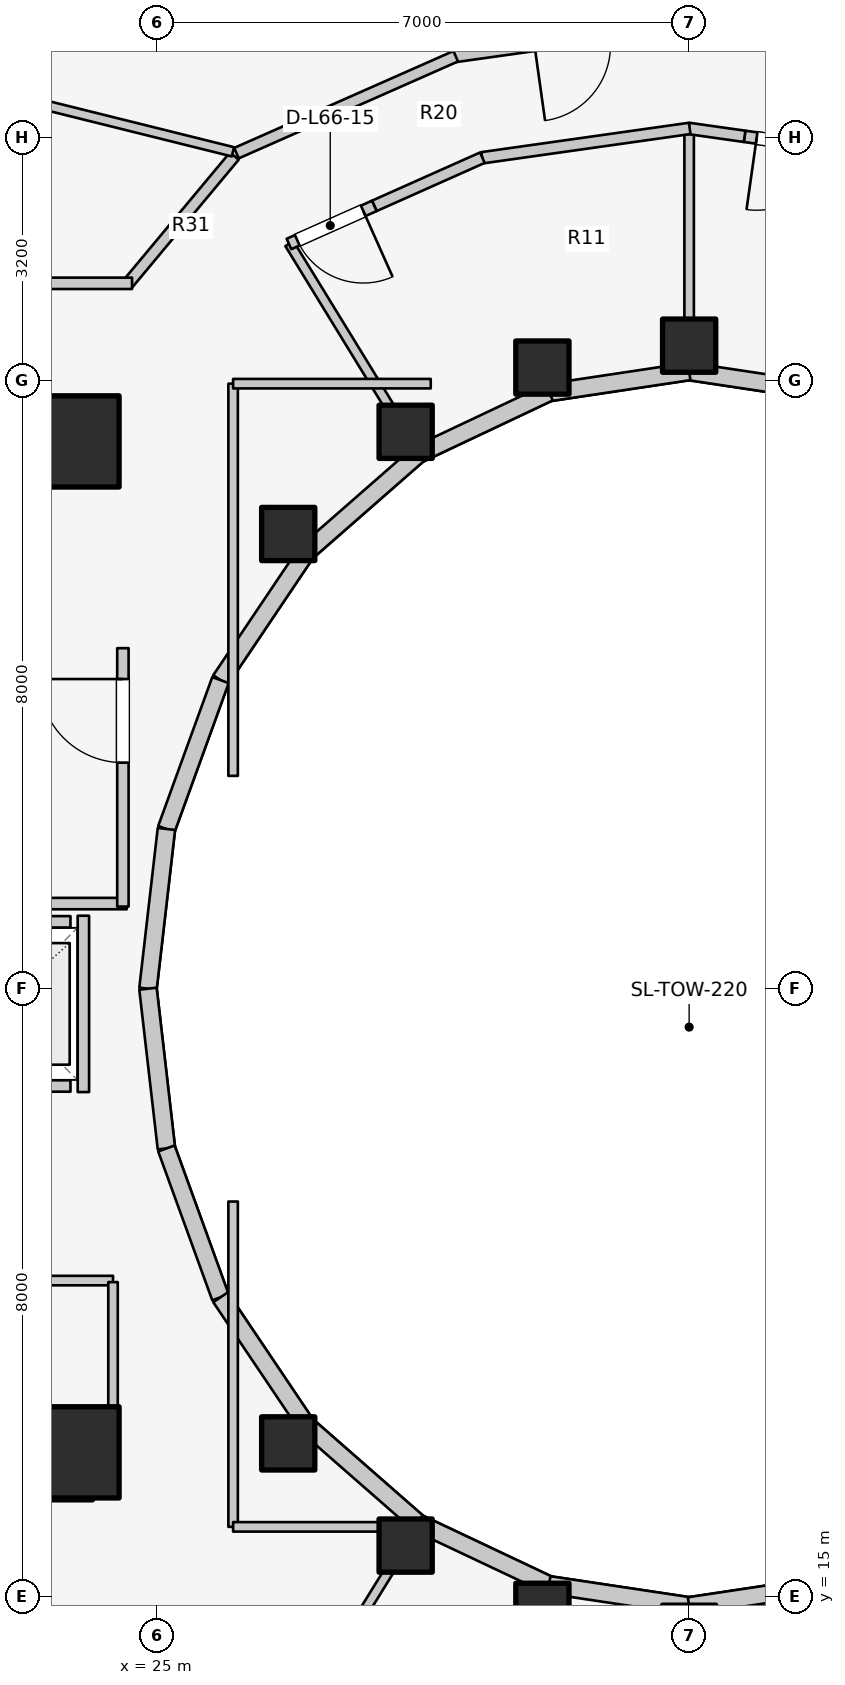
"""IFC4 building model, lengths in metres.
Left out: names, types, materials, properties, quantities, classifications, styles, units other than length and angle.
Written with IfcOpenShell. Run it as: python <this file> out.ifc"""

import sys

from ifc_helpers import new_model, si_unit, direction, frame, frame_2d, origin, origin_2d, place, context, subcontext, project, spatial, rectangle, extrude, element, fill, save


model = new_model("IFC4")
c1 = context("Model", 3, precision=1e-05, world=origin(), true_north=direction((0.0, 1.0)))
c2 = subcontext(c1, "Body", "Model", "MODEL_VIEW")
j1 = project(units=[si_unit("LENGTHUNIT", "METRE"), si_unit("PLANEANGLEUNIT", "RADIAN")], contexts=[c1])
p1 = place(None, origin())
s1 = spatial("IfcSite", under=j1, at=p1, CompositionType="ELEMENT")
p2 = place(p1, origin())
s2 = spatial("IfcBuilding", under=s1, at=p2, CompositionType="ELEMENT")
p3 = place(p2, frame((0.0, 0.0, 217.1)))
s3 = spatial("IfcBuildingStorey", under=s2, at=p3, CompositionType="ELEMENT", Elevation=217.1)
for number, where, z_axis, x_axis in (
    (1, (19.65, 16.55, 0.0), (0.0, 0.0, 1.0), (1.0, 0.0, 0.0)),
    (2, (19.65, 30.35, 0.0), (0.0, 0.0, 1.0), (1.0, 0.0, 0.0)),
):
    element("IfcWall", number, at=place(p3, frame(where, z_axis=z_axis, x_axis=x_axis)), inside=s3, PredefinedType="SHEAR", context=c2, shape_type="SweptSolid", body=[
        extrude(rectangle(XDim=4.5, YDim=0.55, at=frame_2d((2.25, 0.0))), origin(), (0.0, 0.0, 1.0), 3.1),
    ])
for number, where, z_axis, x_axis in (
    (3, (23.9, 16.9, 0.0), (0.0, 0.0, 1.0), (1.0, 0.0, 0.0)),
    (4, (23.9, 30.2, 0.0), (0.0, 0.0, 1.0), (1.0, 0.0, 0.0)),
):
    element("IfcColumn", number, at=place(p3, frame(where, z_axis=z_axis, x_axis=x_axis)), inside=s3, PredefinedType="COLUMN", context=c2, shape_type="SweptSolid", body=[
        extrude(rectangle(XDim=1.2, YDim=1.2, at=origin_2d()), origin(), (0.0, 0.0, 1.0), 3.1),
    ])
for number, where, z_axis, x_axis in (
    (5, (32.0, 31.46, 0.0), (0.0, 0.0, 1.0), (1.0, 0.0, 0.0)),
    (6, (30.069, 31.172, 0.0), (0.0, 0.0, 1.0), (1.0, 0.0, 0.0)),
    (7, (28.27, 30.327, 0.0), (0.0, 0.0, 1.0), (1.0, 0.0, 0.0)),
    (8, (26.725, 28.982, 0.0), (0.0, 0.0, 1.0), (1.0, 0.0, 0.0)),
    (9, (26.725, 17.018, 0.0), (0.0, 0.0, 1.0), (1.0, 0.0, 0.0)),
    (10, (28.27, 15.673, 0.0), (0.0, 0.0, 1.0), (1.0, 0.0, 0.0)),
    (11, (30.069, 14.828, 0.0), (0.0, 0.0, 1.0), (1.0, 0.0, 0.0)),
    (12, (32.0, 14.54, 0.0), (0.0, 0.0, 1.0), (1.0, 0.0, 0.0)),
):
    element("IfcColumn", number, at=place(p3, frame(where, z_axis=z_axis, x_axis=x_axis)), inside=s3, PredefinedType="COLUMN", context=c2, shape_type="SweptSolid", body=[
        extrude(rectangle(XDim=0.7, YDim=0.7, at=origin_2d()), origin(), (0.0, 0.0, 1.0), 3.1),
    ])
for number, where, z_axis, x_axis in (
    (13, (33.843, 30.843, 0.0), (0.0, 0.0, 1.0), (-0.989, 0.149, 0.0)),
    (14, (32.0, 31.12, 0.0), (0.0, 0.0, 1.0), (-0.989, -0.149, 0.0)),
):
    element("IfcWall", number, at=place(p3, frame(where, z_axis=z_axis, x_axis=x_axis)), inside=s3, PredefinedType="STANDARD", context=c2, shape_type="SweptSolid", body=[
        extrude(rectangle(XDim=1.864, YDim=0.23, at=frame_2d((0.932, 0.0))), origin(), (0.0, 0.0, 1.0), 1.22),
    ])
p4 = place(p3, frame((30.157, 30.843, 0.0), z_axis=(0.0, 0.0, 1.0), x_axis=(-0.904179699603, -0.427152280606, 0.0)))
e15 = element("IfcWall", 15, at=p4, inside=s3, PredefinedType="STANDARD", context=c2, shape_type="SweptSolid", body=[
    extrude(rectangle(XDim=1.899, YDim=0.23, at=frame_2d((0.95, 0.0))), origin(), (0.0, 0.0, 1.0), 1.22),
])
p5 = place(p3, frame((28.44, 30.032, 0.0), z_axis=(0.0, 0.0, 1.0), x_axis=(-0.752576694707, -0.658504607869, 0.0)))
e16 = element("IfcWall", 16, at=p5, inside=s3, PredefinedType="STANDARD", context=c2, shape_type="SweptSolid", body=[
    extrude(rectangle(XDim=1.959, YDim=0.23, at=frame_2d((0.98, 0.0))), origin(), (0.0, 0.0, 1.0), 1.22),
])
p6 = place(p3, frame((26.965, 28.742, 0.0), z_axis=(0.0, 0.0, 1.0), x_axis=(-0.558197800898, -0.829707909492, 0.0)))
e17 = element("IfcWall", 17, at=p6, inside=s3, PredefinedType="STANDARD", context=c2, shape_type="SweptSolid", body=[
    extrude(rectangle(XDim=2.027, YDim=0.23, at=frame_2d((1.013, 0.0))), origin(), (0.0, 0.0, 1.0), 1.22),
])
p7 = place(p3, frame((25.834, 27.06, 0.0), z_axis=(0.0, 0.0, 1.0), x_axis=(-0.341423187295, -0.93990968033, 0.0)))
e18 = element("IfcWall", 18, at=p7, inside=s3, PredefinedType="STANDARD", context=c2, shape_type="SweptSolid", body=[
    extrude(rectangle(XDim=2.084, YDim=0.23, at=frame_2d((1.042, 0.0))), origin(), (0.0, 0.0, 1.0), 2.56),
])
for number, where, z_axis, x_axis in (
    (19, (25.123, 25.102, 0.0), (0.0, 0.0, 1.0), (-0.115, -0.993, 0.0)),
    (20, (24.88, 23.0, 0.0), (0.0, 0.0, 1.0), (0.115, -0.993, 0.0)),
):
    element("IfcWall", number, at=place(p3, frame(where, z_axis=z_axis, x_axis=x_axis)), inside=s3, PredefinedType="STANDARD", context=c2, shape_type="SweptSolid", body=[
        extrude(rectangle(XDim=2.115, YDim=0.23, at=frame_2d((1.058, 0.0))), origin(), (0.0, 0.0, 1.0), 2.56),
    ])
p8 = place(p3, frame((25.123, 20.898, 0.0), z_axis=(0.0, 0.0, 1.0), x_axis=(0.341423187295, -0.93990968033, 0.0)))
e21 = element("IfcWall", 21, at=p8, inside=s3, PredefinedType="STANDARD", context=c2, shape_type="SweptSolid", body=[
    extrude(rectangle(XDim=2.084, YDim=0.23, at=frame_2d((1.042, 0.0))), origin(), (0.0, 0.0, 1.0), 2.56),
])
p9 = place(p3, frame((25.834, 18.94, 0.0), z_axis=(0.0, 0.0, 1.0), x_axis=(0.558197800898, -0.829707909492, 0.0)))
e22 = element("IfcWall", 22, at=p9, inside=s3, PredefinedType="STANDARD", context=c2, shape_type="SweptSolid", body=[
    extrude(rectangle(XDim=2.027, YDim=0.23, at=frame_2d((1.013, 0.0))), origin(), (0.0, 0.0, 1.0), 1.22),
])
p10 = place(p3, frame((26.965, 17.258, 0.0), z_axis=(0.0, 0.0, 1.0), x_axis=(0.752576694707, -0.658504607869, 0.0)))
e23 = element("IfcWall", 23, at=p10, inside=s3, PredefinedType="STANDARD", context=c2, shape_type="SweptSolid", body=[
    extrude(rectangle(XDim=1.959, YDim=0.23, at=frame_2d((0.98, 0.0))), origin(), (0.0, 0.0, 1.0), 1.22),
])
p11 = place(p3, frame((28.44, 15.968, 0.0), z_axis=(0.0, 0.0, 1.0), x_axis=(0.904179699603, -0.427152280606, 0.0)))
e24 = element("IfcWall", 24, at=p11, inside=s3, PredefinedType="STANDARD", context=c2, shape_type="SweptSolid", body=[
    extrude(rectangle(XDim=1.899, YDim=0.23, at=frame_2d((0.95, 0.0))), origin(), (0.0, 0.0, 1.0), 1.22),
])
for number, where, z_axis, x_axis in (
    (25, (30.157, 15.157, 0.0), (0.0, 0.0, 1.0), (0.989, -0.149, 0.0)),
    (26, (32.0, 14.88, 0.0), (0.0, 0.0, 1.0), (0.989, 0.149, 0.0)),
):
    element("IfcWall", number, at=place(p3, frame(where, z_axis=z_axis, x_axis=x_axis)), inside=s3, PredefinedType="STANDARD", context=c2, shape_type="SweptSolid", body=[
        extrude(rectangle(XDim=1.864, YDim=0.23, at=frame_2d((0.932, 0.0))), origin(), (0.0, 0.0, 1.0), 1.22),
    ])
p12 = place(p3, frame((22.04, 21.72, 0.0), z_axis=(0.0, 0.0, 1.0), x_axis=(1.0, 0.0, 0.0)))
e27 = element("IfcWall", 27, at=p12, inside=s3, PredefinedType="SOLIDWALL", context=c2, shape_type="SweptSolid", body=[
    extrude(rectangle(XDim=1.82, YDim=0.15, at=frame_2d((0.91, 0.0))), origin(), (0.0, 0.0, 1.0), 2.12),
])
p13 = place(p12, frame((0.36, 0.0, 0.0)))
e28 = element("IfcOpeningElement", 28, at=p13, cuts=e27, PredefinedType="OPENING", context=c2, shape_type="SweptSolid", body=[
    extrude(rectangle(XDim=1.1, YDim=2.1, at=frame_2d((0.55, 1.05))), frame((0.0, 0.085, 0.0), z_axis=(0.0, -1.0, 0.0), x_axis=(1.0, 0.0, 0.0)), (0.0, 0.0, 1.0), 0.17),
])
p14 = place(p3, frame((22.04, 23.88, 0.0), z_axis=(0.0, 0.0, 1.0), x_axis=(1.0, 0.0, 0.0)))
e29 = element("IfcWall", 29, at=p14, inside=s3, PredefinedType="SOLIDWALL", context=c2, shape_type="SweptSolid", body=[
    extrude(rectangle(XDim=1.82, YDim=0.15, at=frame_2d((0.91, 0.0))), origin(), (0.0, 0.0, 1.0), 2.12),
])
p15 = place(p3, frame((24.03, 21.64, 0.0), z_axis=(0.0, 0.0, 1.0), x_axis=(0.0, 1.0, 0.0)))
e30 = element("IfcWall", 30, at=p15, inside=s3, PredefinedType="SOLIDWALL", context=c2, shape_type="SweptSolid", body=[
    extrude(rectangle(XDim=2.32, YDim=0.15, at=frame_2d((1.16, 0.0))), origin(), (0.0, 0.0, 1.0), 2.12),
])
p16 = place(p3, frame((19.52, 24.12, 0.0), z_axis=(0.0, 0.0, 1.0), x_axis=(1.0, 0.0, 0.0)))
e31 = element("IfcWall", 31, at=p16, inside=s3, PredefinedType="PARTITIONING", context=c2, shape_type="SweptSolid", body=[
    extrude(rectangle(XDim=5.08, YDim=0.15, at=frame_2d((2.54, 0.0))), origin(), (0.0, 0.0, 1.0), 2.12),
])
p17 = place(p3, frame((24.55, 24.08, 0.0), z_axis=(0.0, 0.0, 1.0), x_axis=(0.0, 1.0, 0.0)))
e32 = element("IfcWall", 32, at=p17, inside=s3, PredefinedType="PARTITIONING", context=c2, shape_type="SweptSolid", body=[
    extrude(rectangle(XDim=3.4, YDim=0.15, at=frame_2d((1.7, 0.0))), origin(), (0.0, 0.0, 1.0), 2.575),
])
p18 = place(p17, frame((1.894, 0.0, 0.0)))
e33 = element("IfcOpeningElement", 33, at=p18, cuts=e32, PredefinedType="OPENING", context=c2, shape_type="SweptSolid", body=[
    extrude(rectangle(XDim=1.1, YDim=2.1, at=frame_2d((0.55, 1.05))), frame((0.0, 0.085, 0.0), z_axis=(0.0, -1.0, 0.0), x_axis=(1.0, 0.0, 0.0)), (0.0, 0.0, 1.0), 0.17),
])
p19 = place(p3, frame((19.55, 19.16, 0.0), z_axis=(0.0, 0.0, 1.0), x_axis=(1.0, 0.0, 0.0)))
e34 = element("IfcWall", 34, at=p19, inside=s3, PredefinedType="PARTITIONING", context=c2, shape_type="SweptSolid", body=[
    extrude(rectangle(XDim=4.87, YDim=0.125, at=frame_2d((2.435, 0.0))), origin(), (0.0, 0.0, 1.0), 2.12),
])
p20 = place(p19, frame((2.272, 0.0, 0.0)))
e35 = element("IfcOpeningElement", 35, at=p20, cuts=e34, PredefinedType="OPENING", context=c2, shape_type="SweptSolid", body=[
    extrude(rectangle(XDim=0.85, YDim=2.05, at=frame_2d((0.425, 1.025))), frame((0.0, 0.073, 0.0), z_axis=(0.0, -1.0, 0.0), x_axis=(1.0, 0.0, 0.0)), (0.0, 0.0, 1.0), 0.145),
])
p21 = place(p3, frame((24.42, 17.1, 0.0), z_axis=(0.0, 0.0, 1.0), x_axis=(0.0, 1.0, 0.0)))
e36 = element("IfcWall", 36, at=p21, inside=s3, PredefinedType="PARTITIONING", context=c2, shape_type="SweptSolid", body=[
    extrude(rectangle(XDim=2.04, YDim=0.125, at=frame_2d((1.02, 0.0))), origin(), (0.0, 0.0, 1.0), 1.952),
])
p22 = place(p3, frame((32.0, 31.1, 0.0), z_axis=(0.0, 0.0, 1.0), x_axis=(0.0, 1.0, 0.0)))
e37 = element("IfcWall", 37, at=p22, inside=s3, PredefinedType="PARTITIONING", context=c2, shape_type="SweptSolid", body=[
    extrude(rectangle(XDim=3.218, YDim=0.125, at=frame_2d((1.609, 0.0))), origin(), (0.0, 0.0, 1.0), 1.22),
])
p23 = place(p3, frame((28.45, 30.015, 0.0), z_axis=(0.0, 0.0, 1.0), x_axis=(-0.522763432117, 0.852477796802, 0.0)))
e38 = element("IfcWall", 38, at=p23, inside=s3, PredefinedType="PARTITIONING", context=c2, shape_type="SweptSolid", body=[
    extrude(rectangle(XDim=3.269, YDim=0.125, at=frame_2d((1.635, 0.0))), origin(), (0.0, 0.0, 1.0), 1.22),
])
p24 = place(p3, frame((33.987, 34.036, 0.0), z_axis=(0.0, 0.0, 1.0), x_axis=(-0.990133183593, 0.140129507055, 0.0)))
e39 = element("IfcWall", 39, at=p24, inside=s3, PredefinedType="PARTITIONING", context=c2, shape_type="SweptSolid", body=[
    extrude(rectangle(XDim=1.27, YDim=0.15, at=frame_2d((0.635, 0.0))), origin(), (0.0, 0.0, 1.0), 2.16),
])
p25 = place(p24, frame((0.16, 0.0, 0.0)))
e40 = element("IfcOpeningElement", 40, at=p25, cuts=e39, PredefinedType="OPENING", context=c2, shape_type="SweptSolid", body=[
    extrude(rectangle(XDim=0.95, YDim=2.1, at=frame_2d((0.475, 1.05))), frame((0.0, 0.085, 0.0), z_axis=(0.0, -1.0, 0.0), x_axis=(1.0, 0.0, 0.0)), (0.0, 0.0, 1.0), 0.17),
])
p26 = place(p3, frame((32.729, 34.214, 0.0), z_axis=(0.0, 0.0, 1.0), x_axis=(-0.990138882688, 0.140089232242, 0.0)))
e41 = element("IfcWall", 41, at=p26, inside=s3, PredefinedType="PARTITIONING", context=c2, shape_type="SweptSolid", body=[
    extrude(rectangle(XDim=0.744, YDim=0.15, at=frame_2d((0.372, 0.0))), origin(), (0.0, 0.0, 1.0), 1.22),
])
p27 = place(p3, frame((32.007, 34.318, 0.0), z_axis=(0.0, 0.0, 1.0), x_axis=(-0.990150268487, -0.140008734782, 0.0)))
e42 = element("IfcWall", 42, at=p27, inside=s3, PredefinedType="PARTITIONING", context=c2, shape_type="SweptSolid", body=[
    extrude(rectangle(XDim=2.759, YDim=0.15, at=frame_2d((1.379, 0.0))), origin(), (0.0, 0.0, 1.0), 1.22),
])
p28 = place(p3, frame((29.28, 33.933, 0.0), z_axis=(0.0, 0.0, 1.0), x_axis=(-0.913286906099, -0.407316863324, 0.0)))
e43 = element("IfcWall", 43, at=p28, inside=s3, PredefinedType="PARTITIONING", context=c2, shape_type="SweptSolid", body=[
    extrude(rectangle(XDim=1.557, YDim=0.15, at=frame_2d((0.778, 0.0))), origin(), (0.0, 0.0, 1.0), 1.22),
])
p29 = place(p3, frame((27.858, 33.299, 0.0), z_axis=(0.0, 0.0, 1.0), x_axis=(-0.91321306925, -0.407482380172, 0.0)))
e44 = element("IfcWall", 44, at=p29, inside=s3, PredefinedType="PARTITIONING", context=c2, shape_type="SweptSolid", body=[
    extrude(rectangle(XDim=1.23, YDim=0.15, at=frame_2d((0.615, 0.0))), origin(), (0.0, 0.0, 1.0), 2.16),
])
p30 = place(p29, frame((0.16, 0.0, 0.0)))
e45 = element("IfcOpeningElement", 45, at=p30, cuts=e44, PredefinedType="OPENING", context=c2, shape_type="SweptSolid", body=[
    extrude(rectangle(XDim=0.95, YDim=2.1, at=frame_2d((0.475, 1.05))), frame((0.0, 0.085, 0.0), z_axis=(0.0, -1.0, 0.0), x_axis=(1.0, 0.0, 0.0)), (0.0, 0.0, 1.0), 0.17),
])
p31 = place(p3, frame((28.45, 15.985, 0.0), z_axis=(0.0, 0.0, 1.0), x_axis=(-0.52592395012, -0.850531597702, 0.0)))
e46 = element("IfcWall", 46, at=p31, inside=s3, PredefinedType="PARTITIONING", context=c2, shape_type="SweptSolid", body=[
    extrude(rectangle(XDim=2.869, YDim=0.125, at=frame_2d((1.435, 0.0))), origin(), (0.0, 0.0, 1.0), 1.22),
])
p32 = place(p3, frame((32.0, 14.9, 0.0), z_axis=(0.0, 0.0, 1.0), x_axis=(0.0, -1.0, 0.0)))
e47 = element("IfcWall", 47, at=p32, inside=s3, PredefinedType="PARTITIONING", context=c2, shape_type="SweptSolid", body=[
    extrude(rectangle(XDim=2.818, YDim=0.125, at=frame_2d((1.409, 0.0))), origin(), (0.0, 0.0, 1.0), 1.22),
])
p33 = place(p3, frame((26.0, 25.8, 0.0), z_axis=(0.0, 0.0, 1.0), x_axis=(0.0, 1.0, 0.0)))
e48 = element("IfcWall", 48, at=p33, inside=s3, PredefinedType="PARTITIONING", context=c2, shape_type="SweptSolid", body=[
    extrude(rectangle(XDim=5.16, YDim=0.125, at=frame_2d((2.58, 0.0))), origin(), (0.0, 0.0, 1.0), 1.952),
])
p34 = place(p3, frame((26.0, 30.96, 0.0), z_axis=(0.0, 0.0, 1.0), x_axis=(1.0, 0.0, 0.0)))
e49 = element("IfcWall", 49, at=p34, inside=s3, PredefinedType="PARTITIONING", context=c2, shape_type="SweptSolid", body=[
    extrude(rectangle(XDim=2.6, YDim=0.125, at=frame_2d((1.3, 0.0))), origin(), (0.0, 0.0, 1.0), 1.22),
])
p35 = place(p3, frame((26.0, 15.92, 0.0), z_axis=(0.0, 0.0, 1.0), x_axis=(0.0, 1.0, 0.0)))
e50 = element("IfcWall", 50, at=p35, inside=s3, PredefinedType="PARTITIONING", context=c2, shape_type="SweptSolid", body=[
    extrude(rectangle(XDim=4.28, YDim=0.125, at=frame_2d((2.14, 0.0))), origin(), (0.0, 0.0, 1.0), 1.22),
])
p36 = place(p3, frame((26.0, 15.92, 0.0), z_axis=(0.0, 0.0, 1.0), x_axis=(1.0, 0.0, 0.0)))
e51 = element("IfcWall", 51, at=p36, inside=s3, PredefinedType="PARTITIONING", context=c2, shape_type="SweptSolid", body=[
    extrude(rectangle(XDim=2.6, YDim=0.125, at=frame_2d((1.3, 0.0))), origin(), (0.0, 0.0, 1.0), 1.22),
])
p37 = place(p3, frame((26.016, 33.955, 0.0), z_axis=(0.0, 0.0, 1.0), x_axis=(-0.64030392053, -0.76812166312, 0.0)))
e52 = element("IfcWall", 52, at=p37, inside=s3, PredefinedType="PARTITIONING", context=c2, shape_type="SweptSolid", body=[
    extrude(rectangle(XDim=2.21, YDim=0.15, at=frame_2d((1.105, 0.0))), origin(), (0.0, 0.0, 1.0), 1.22),
])
p38 = place(p3, frame((19.098, 32.28, 0.0), z_axis=(0.0, 0.0, 1.0), x_axis=(1.0, 0.0, 0.0)))
e53 = element("IfcWall", 53, at=p38, inside=s3, PredefinedType="PARTITIONING", context=c2, shape_type="SweptSolid", body=[
    extrude(rectangle(XDim=5.572, YDim=0.15, at=frame_2d((2.786, 0.0))), origin(), (0.0, 0.0, 1.0), 1.22),
])
p39 = place(p3, frame((25.998, 34.01, 0.0), z_axis=(0.0, 0.0, 1.0), x_axis=(-0.970445810114, 0.241319144769, 0.0)))
e54 = element("IfcWall", 54, at=p39, inside=s3, PredefinedType="PARTITIONING", context=c2, shape_type="SweptSolid", body=[
    extrude(rectangle(XDim=5.526, YDim=0.125, at=frame_2d((2.763, 0.0))), origin(), (0.0, 0.0, 1.0), 1.22),
])
p40 = place(p3, frame((35.087, 35.263, 0.0), z_axis=(0.0, 0.0, 1.0), x_axis=(-0.990268690673, 0.139168675614, 0.0)))
e55 = element("IfcWall", 55, at=p40, inside=s3, PredefinedType="PARTITIONING", context=c2, shape_type="SweptSolid", body=[
    extrude(rectangle(XDim=3.126, YDim=0.15, at=frame_2d((1.563, 0.0))), origin(), (0.0, 0.0, 1.0), 1.22),
])
p41 = place(p3, frame((31.114, 35.572, 0.0), z_axis=(0.0, 0.0, 1.0), x_axis=(-0.990279679751, -0.139090459315, 0.0)))
e56 = element("IfcWall", 56, at=p41, inside=s3, PredefinedType="PARTITIONING", context=c2, shape_type="SweptSolid", body=[
    extrude(rectangle(XDim=1.32, YDim=0.15, at=frame_2d((0.66, 0.0))), origin(), (0.0, 0.0, 1.0), 2.575),
])
p42 = place(p41, frame((0.16, 0.0, 0.0)))
e57 = element("IfcOpeningElement", 57, at=p42, cuts=e56, PredefinedType="OPENING", context=c2, shape_type="SweptSolid", body=[
    extrude(rectangle(XDim=1.0, YDim=2.1, at=frame_2d((0.5, 1.05))), frame((0.0, 0.085, 0.0), z_axis=(0.0, -1.0, 0.0), x_axis=(1.0, 0.0, 0.0)), (0.0, 0.0, 1.0), 0.17),
])
p43 = place(p3, frame((29.807, 35.389, 0.0), z_axis=(0.0, 0.0, 1.0), x_axis=(-0.990260655864, -0.139225836137, 0.0)))
e58 = element("IfcWall", 58, at=p43, inside=s3, PredefinedType="PARTITIONING", context=c2, shape_type="SweptSolid", body=[
    extrude(rectangle(XDim=0.903, YDim=0.15, at=frame_2d((0.452, 0.0))), origin(), (0.0, 0.0, 1.0), 2.575),
])
p44 = place(p3, frame((28.929, 35.268, 0.0), z_axis=(0.0, 0.0, 1.0), x_axis=(-0.914642679993, -0.404263240891, 0.0)))
e59 = element("IfcWall", 59, at=p44, inside=s3, PredefinedType="PARTITIONING", context=c2, shape_type="SweptSolid", body=[
    extrude(rectangle(XDim=3.154, YDim=0.15, at=frame_2d((1.577, 0.0))), origin(), (0.0, 0.0, 1.0), 1.22),
])
p45 = place(p18, origin())
e60 = element("IfcDoor", 60, at=p45, inside=s3, OperationType="SINGLE_SWING_RIGHT", PredefinedType="DOOR", context=c2, shape_type="SweptSolid", body=[
    extrude(rectangle(XDim=1.1, YDim=2.1, at=frame_2d((0.55, 1.05))), frame((0.0, 0.025, 0.0), z_axis=(0.0, -1.0, 0.0), x_axis=(1.0, 0.0, 0.0)), (0.0, 0.0, 1.0), 0.05),
])
fill(e33, e60)
p46 = place(p25, origin())
e61 = element("IfcDoor", 61, at=p46, inside=s3, OperationType="SINGLE_SWING_RIGHT", PredefinedType="DOOR", context=c2, shape_type="SweptSolid", body=[
    extrude(rectangle(XDim=0.95, YDim=2.1, at=frame_2d((0.475, 1.05))), frame((0.0, 0.025, 0.0), z_axis=(0.0, -1.0, 0.0), x_axis=(1.0, 0.0, 0.0)), (0.0, 0.0, 1.0), 0.05),
])
fill(e40, e61)
p47 = place(p30, origin())
e62 = element("IfcDoor", 62, at=p47, inside=s3, OperationType="SINGLE_SWING_LEFT", PredefinedType="DOOR", context=c2, shape_type="SweptSolid", body=[
    extrude(rectangle(XDim=0.95, YDim=2.1, at=frame_2d((0.475, 1.05))), frame((0.0, 0.025, 0.0), z_axis=(0.0, -1.0, 0.0), x_axis=(1.0, 0.0, 0.0)), (0.0, 0.0, 1.0), 0.05),
])
fill(e45, e62)
save(model, sys.argv[1])
